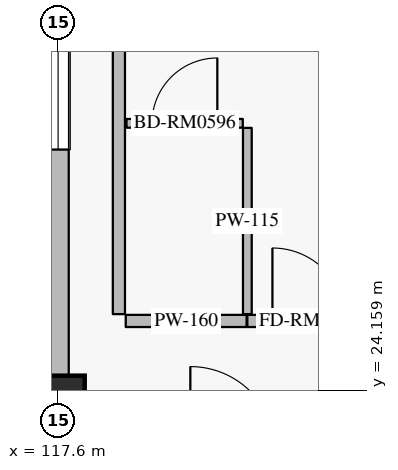
"""IFC4 building model, lengths in metres.
Left out: names, types, materials, properties, quantities, classifications, styles, units other than length and angle.
Written with IfcOpenShell. Run it as: python <this file> out.ifc"""

import sys

from ifc_helpers import new_model, si_unit, direction, frame, frame_2d, origin, origin_2d, place, context, subcontext, project, spatial, rectangle, extrude, element, fill, save


model = new_model("IFC4")
c1 = context("Model", 3, precision=1e-05, world=origin(), true_north=direction((0.0, 1.0)))
c2 = subcontext(c1, "Body", "Model", "MODEL_VIEW")
j1 = project(units=[si_unit("LENGTHUNIT", "METRE"), si_unit("PLANEANGLEUNIT", "RADIAN")], contexts=[c1])
p1 = place(None, origin())
s1 = spatial("IfcSite", under=j1, at=p1, CompositionType="ELEMENT")
p2 = place(p1, origin())
s2 = spatial("IfcBuilding", under=s1, at=p2, CompositionType="ELEMENT")
p3 = place(p2, frame((0.0, 0.0, 21.0)))
s3 = spatial("IfcBuildingStorey", under=s2, at=p3, CompositionType="ELEMENT", Elevation=21.0)
p4 = place(p3, frame((117.6, 24.0, 0.0), z_axis=(0.0, 0.0, 1.0), x_axis=(1.0, 0.0, 0.0)))
e1 = element("IfcColumn", 1, at=p4, inside=s3, PredefinedType="COLUMN", context=c2, shape_type="SweptSolid", body=[
    extrude(rectangle(XDim=0.7, YDim=0.7, at=origin_2d()), origin(), (0.0, 0.0, 1.0), 4.2),
])
p5 = place(p3, frame((117.6, 24.35, 0.0), z_axis=(0.0, 0.0, 1.0), x_axis=(0.0, 1.0, 0.0)))
e2 = element("IfcWall", 2, at=p5, inside=s3, PredefinedType="SOLIDWALL", context=c2, shape_type="SweptSolid", body=[
    extrude(rectangle(XDim=7.25, YDim=0.28, at=frame_2d((3.625, 0.0))), origin(), (0.0, 0.0, 1.0), 3.3),
])
p6 = place(p5, frame((2.975, 0.0, 0.75)))
e3 = element("IfcOpeningElement", 3, at=p6, cuts=e2, PredefinedType="OPENING", context=c2, shape_type="SweptSolid", body=[
    extrude(rectangle(XDim=1.3, YDim=1.65, at=frame_2d((0.65, 0.825))), frame((0.0, 0.15, 0.0), z_axis=(0.0, -1.0, 0.0), x_axis=(1.0, 0.0, 0.0)), (0.0, 0.0, 1.0), 0.3),
])
p7 = place(p3, frame((118.49, 25.07, 0.0), z_axis=(0.0, 0.0, 1.0), x_axis=(1.0, 0.0, 0.0)))
e4 = element("IfcWall", 4, at=p7, inside=s3, PredefinedType="PARTITIONING", context=c2, shape_type="SweptSolid", body=[
    extrude(rectangle(XDim=1.59, YDim=0.16, at=frame_2d((0.795, 0.0))), origin(), (0.0, 0.0, 1.0), 3.965),
])
p8 = place(p3, frame((120.09, 25.07, 0.0), z_axis=(0.0, 0.0, 1.0), x_axis=(1.0, 0.0, 0.0)))
e5 = element("IfcWall", 5, at=p8, inside=s3, PredefinedType="PARTITIONING", context=c2, shape_type="SweptSolid", body=[
    extrude(rectangle(XDim=1.62, YDim=0.16, at=frame_2d((0.81, 0.0))), origin(), (0.0, 0.0, 1.0), 3.965),
])
p9 = place(p8, frame((0.33, 0.0, 0.0)))
e6 = element("IfcOpeningElement", 6, at=p9, cuts=e5, PredefinedType="OPENING", context=c2, shape_type="SweptSolid", body=[
    extrude(rectangle(XDim=0.96, YDim=2.2, at=frame_2d((0.48, 1.1))), frame((0.0, 0.09, 0.0), z_axis=(0.0, -1.0, 0.0), x_axis=(1.0, 0.0, 0.0)), (0.0, 0.0, 1.0), 0.18),
])
p10 = place(p3, frame((120.09, 25.16, 0.0), z_axis=(0.0, 0.0, 1.0), x_axis=(0.0, 1.0, 0.0)))
e7 = element("IfcWall", 7, at=p10, inside=s3, PredefinedType="PARTITIONING", context=c2, shape_type="SweptSolid", body=[
    extrude(rectangle(XDim=2.45, YDim=0.115, at=frame_2d((1.225, 0.0))), origin(), (0.0, 0.0, 1.0), 3.965),
])
p11 = place(p3, frame((118.5, 27.67, 0.0), z_axis=(0.0, 0.0, 1.0), x_axis=(1.0, 0.0, 0.0)))
e8 = element("IfcWall", 8, at=p11, inside=s3, PredefinedType="PARTITIONING", context=c2, shape_type="SweptSolid", body=[
    extrude(rectangle(XDim=1.53, YDim=0.115, at=frame_2d((0.765, 0.0))), origin(), (0.0, 0.0, 1.0), 3.965),
])
p12 = place(p11, frame((0.335, 0.0, 0.0)))
e9 = element("IfcOpeningElement", 9, at=p12, cuts=e8, PredefinedType="OPENING", context=c2, shape_type="SweptSolid", body=[
    extrude(rectangle(XDim=0.86, YDim=2.12, at=frame_2d((0.43, 1.06))), frame((0.0, 0.067, 0.0), z_axis=(0.0, -1.0, 0.0), x_axis=(1.0, 0.0, 0.0)), (0.0, 0.0, 1.0), 0.135),
])
p13 = place(p3, frame((118.4, 25.16, 0.0), z_axis=(0.0, 0.0, 1.0), x_axis=(0.0, 1.0, 0.0)))
e10 = element("IfcWall", 10, at=p13, inside=s3, PredefinedType="PARTITIONING", context=c2, shape_type="SweptSolid", body=[
    extrude(rectangle(XDim=6.5, YDim=0.16, at=frame_2d((3.25, 0.0))), origin(), (0.0, 0.0, 1.0), 3.965),
])
p14 = place(p6, origin())
e11 = element("IfcWindow", 11, at=p14, inside=s3, PartitioningType="SINGLE_PANEL", PredefinedType="WINDOW", context=c2, shape_type="SweptSolid", body=[
    extrude(rectangle(XDim=1.3, YDim=1.65, at=frame_2d((0.65, 0.825))), frame((0.0, 0.03, 0.0), z_axis=(0.0, -1.0, 0.0), x_axis=(1.0, 0.0, 0.0)), (0.0, 0.0, 1.0), 0.06),
])
fill(e3, e11)
p15 = place(p9, origin())
e12 = element("IfcDoor", 12, at=p15, inside=s3, OperationType="SINGLE_SWING_LEFT", PredefinedType="DOOR", context=c2, shape_type="SweptSolid", body=[
    extrude(rectangle(XDim=0.96, YDim=2.2, at=frame_2d((0.48, 1.1))), frame((0.0, 0.025, 0.0), z_axis=(0.0, -1.0, 0.0), x_axis=(1.0, 0.0, 0.0)), (0.0, 0.0, 1.0), 0.05),
])
fill(e6, e12)
p16 = place(p12, origin())
e13 = element("IfcDoor", 13, at=p16, inside=s3, OperationType="SINGLE_SWING_RIGHT", PredefinedType="DOOR", context=c2, shape_type="SweptSolid", body=[
    extrude(rectangle(XDim=0.86, YDim=2.12, at=frame_2d((0.43, 1.06))), frame((0.0, 0.025, 0.0), z_axis=(0.0, -1.0, 0.0), x_axis=(1.0, 0.0, 0.0)), (0.0, 0.0, 1.0), 0.05),
])
fill(e9, e13)
save(model, sys.argv[1])
